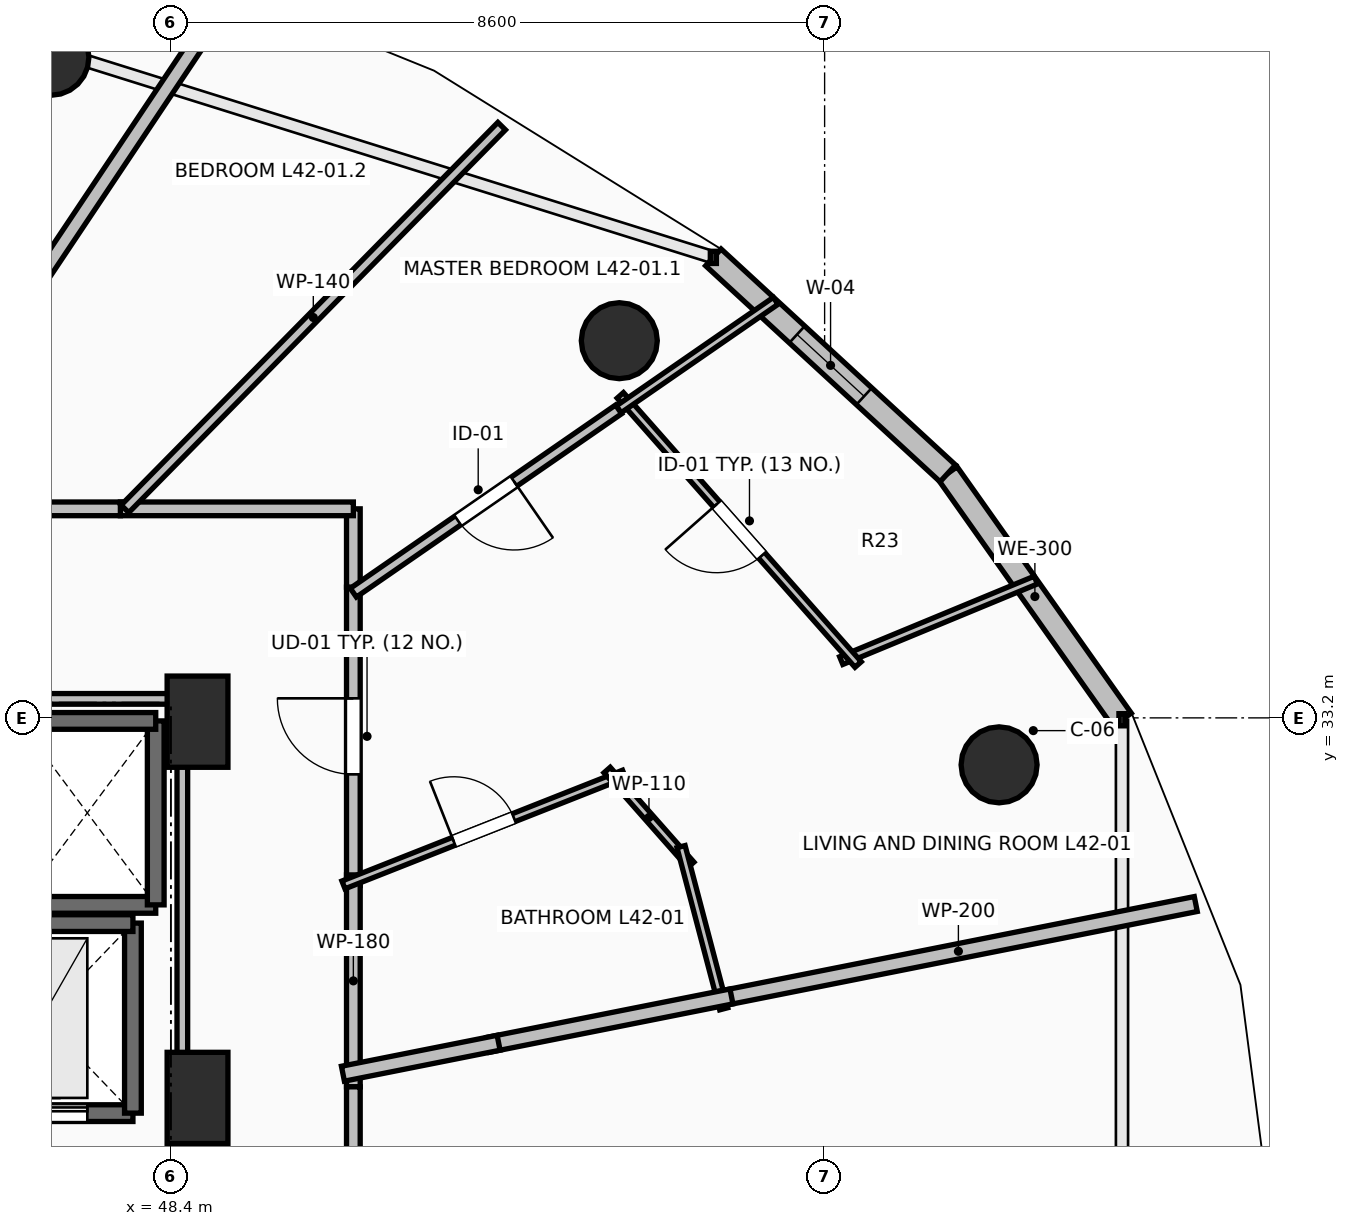
"""IFC4 building model, lengths in metres.
Left out: names, types, materials, properties, quantities, classifications, styles, units other than length and angle.
Written with IfcOpenShell. Run it as: python <this file> out.ifc"""

import sys

from ifc_helpers import new_model, si_unit, direction, frame, frame_2d, origin, origin_2d, place, context, subcontext, project, spatial, rectangle, circle, extrude, element, fill, save


model = new_model("IFC4")
c1 = context("Model", 3, precision=1e-05, world=origin(), true_north=direction((0.0, 1.0)))
c2 = subcontext(c1, "Body", "Model", "MODEL_VIEW")
j1 = project(units=[si_unit("LENGTHUNIT", "METRE"), si_unit("PLANEANGLEUNIT", "RADIAN")], contexts=[c1])
p1 = place(None, origin())
s1 = spatial("IfcSite", under=j1, at=p1, CompositionType="ELEMENT")
p2 = place(p1, origin())
s2 = spatial("IfcBuilding", under=s1, at=p2, CompositionType="ELEMENT")
p3 = place(p2, frame((0.0, 0.0, 157.1)))
s3 = spatial("IfcBuildingStorey", under=s2, at=p3, CompositionType="ELEMENT", Elevation=157.1)
for number, where, z_axis, x_axis in (
    (1, (59.295, 32.582, 0.0), (0.0, 0.0, 1.0), (0.924, 0.383, 0.0)),
    (2, (54.299, 38.162, 0.0), (0.0, 0.0, 1.0), (0.707, 0.707, 0.0)),
    (3, (46.821, 41.891, 0.0), (0.0, 0.0, 1.0), (0.383, 0.924, 0.0)),
):
    element("IfcColumn", number, at=place(p3, frame(where, z_axis=z_axis, x_axis=x_axis)), inside=s3, PredefinedType="COLUMN", context=c2, shape_type="SweptSolid", body=[
        extrude(circle(Radius=0.5, at=origin_2d()), origin(), (0.0, 0.0, 1.0), 3.5),
    ])
for number, where, z_axis, x_axis in (
    (4, (48.75, 33.15, 0.0), (0.0, 0.0, 1.0), (1.0, 0.0, 0.0)),
    (5, (48.75, 28.2, 0.0), (0.0, 0.0, 1.0), (1.0, 0.0, 0.0)),
):
    element("IfcColumn", number, at=place(p3, frame(where, z_axis=z_axis, x_axis=x_axis)), inside=s3, PredefinedType="PILASTER", context=c2, shape_type="SweptSolid", body=[
        extrude(rectangle(XDim=0.8, YDim=1.2, at=origin_2d()), origin(), (0.0, 0.0, 1.0), 3.5),
    ])
p4 = place(p3, frame((60.912, 33.175, 0.0), z_axis=(0.0, 0.0, 1.0), x_axis=(-0.577269753207, 0.816553508371, 0.0)))
e6 = element("IfcWall", 6, at=p4, inside=s3, PredefinedType="STANDARD", context=c2, shape_type="SweptSolid", body=[
    extrude(rectangle(XDim=3.97, YDim=0.3, at=frame_2d((1.985, 0.0))), origin(), (0.0, 0.0, 1.0), 3.24),
])
p5 = place(p3, frame((58.62, 36.417, 0.0), z_axis=(0.0, 0.0, 1.0), x_axis=(-0.735477154165, 0.677549522693, 0.0)))
e7 = element("IfcWall", 7, at=p5, inside=s3, PredefinedType="STANDARD", context=c2, shape_type="SweptSolid", body=[
    extrude(rectangle(XDim=4.194, YDim=0.3, at=frame_2d((2.097, 0.0))), origin(), (0.0, 0.0, 1.0), 3.24),
])
p6 = place(p5, frame((1.497, 0.0, 0.85)))
e8 = element("IfcOpeningElement", 8, at=p6, cuts=e7, PredefinedType="OPENING", context=c2, shape_type="SweptSolid", body=[
    extrude(rectangle(XDim=1.2, YDim=2.1, at=frame_2d((0.6, 1.05))), frame((0.0, 0.165, 0.0), z_axis=(0.0, -1.0, 0.0), x_axis=(1.0, 0.0, 0.0)), (0.0, 0.0, 1.0), 0.33),
])
p7 = place(p3, frame((46.4, 30.74, 0.0), z_axis=(0.0, 0.0, 1.0), x_axis=(1.0, 0.0, 0.0)))
e9 = element("IfcWall", 9, at=p7, inside=s3, PredefinedType="SOLIDWALL", context=c2, shape_type="SweptSolid", body=[
    extrude(rectangle(XDim=1.8, YDim=0.22, at=frame_2d((0.9, 0.0))), origin(), (0.0, 0.0, 1.0), 3.24),
])
p8 = place(p3, frame((48.2, 30.74, 0.0), z_axis=(0.0, 0.0, 1.0), x_axis=(0.0, 1.0, 0.0)))
e10 = element("IfcWall", 10, at=p8, inside=s3, PredefinedType="SOLIDWALL", context=c2, shape_type="SweptSolid", body=[
    extrude(rectangle(XDim=2.42, YDim=0.22, at=frame_2d((1.21, 0.0))), origin(), (0.0, 0.0, 1.0), 3.24),
])
p9 = place(p3, frame((48.2, 33.16, 0.0), z_axis=(0.0, 0.0, 1.0), x_axis=(-1.0, 0.0, 0.0)))
e11 = element("IfcWall", 11, at=p9, inside=s3, PredefinedType="SOLIDWALL", context=c2, shape_type="SweptSolid", body=[
    extrude(rectangle(XDim=1.8, YDim=0.22, at=frame_2d((0.9, 0.0))), origin(), (0.0, 0.0, 1.0), 3.24),
])
p10 = place(p3, frame((45.5, 28.0, 0.0), z_axis=(0.0, 0.0, 1.0), x_axis=(1.0, 0.0, 0.0)))
e12 = element("IfcWall", 12, at=p10, inside=s3, PredefinedType="SHEAR", context=c2, shape_type="SweptSolid", body=[
    extrude(rectangle(XDim=2.4, YDim=0.22, at=frame_2d((1.2, 0.0))), origin(), (0.0, 0.0, 1.0), 3.24),
])
p11 = place(p10, frame((0.6, 0.0, 0.0)))
e13 = element("IfcOpeningElement", 13, at=p11, cuts=e12, PredefinedType="OPENING", context=c2, shape_type="SweptSolid", body=[
    extrude(rectangle(XDim=1.2, YDim=2.2, at=frame_2d((0.6, 1.1))), frame((0.0, 0.125, 0.0), z_axis=(0.0, -1.0, 0.0), x_axis=(1.0, 0.0, 0.0)), (0.0, 0.0, 1.0), 0.25),
])
p12 = place(p3, frame((47.9, 28.0, 0.0), z_axis=(0.0, 0.0, 1.0), x_axis=(0.0, 1.0, 0.0)))
e14 = element("IfcWall", 14, at=p12, inside=s3, PredefinedType="SHEAR", context=c2, shape_type="SweptSolid", body=[
    extrude(rectangle(XDim=2.5, YDim=0.22, at=frame_2d((1.25, 0.0))), origin(), (0.0, 0.0, 1.0), 3.24),
])
p13 = place(p3, frame((47.9, 30.5, 0.0), z_axis=(0.0, 0.0, 1.0), x_axis=(-1.0, 0.0, 0.0)))
e15 = element("IfcWall", 15, at=p13, inside=s3, PredefinedType="SHEAR", context=c2, shape_type="SweptSolid", body=[
    extrude(rectangle(XDim=2.4, YDim=0.22, at=frame_2d((1.2, 0.0))), origin(), (0.0, 0.0, 1.0), 3.24),
])
p14 = place(p3, frame((48.45, 23.95, 0.0), z_axis=(0.0, 0.0, 1.0), x_axis=(0.0, 1.0, 0.0)))
e16 = element("IfcWall", 16, at=p14, inside=s3, PredefinedType="PARTITIONING", context=c2, shape_type="SweptSolid", body=[
    extrude(rectangle(XDim=4.05, YDim=0.18, at=frame_2d((2.025, 0.0))), origin(), (0.0, 0.0, 1.0), 3.24),
])
p15 = place(p14, frame((1.425, 0.0, 0.0)))
e17 = element("IfcOpeningElement", 17, at=p15, cuts=e16, PredefinedType="OPENING", context=c2, shape_type="SweptSolid", body=[
    extrude(rectangle(XDim=1.2, YDim=2.15, at=frame_2d((0.6, 1.075))), frame((0.0, 0.105, 0.0), z_axis=(0.0, -1.0, 0.0), x_axis=(1.0, 0.0, 0.0)), (0.0, 0.0, 1.0), 0.21),
])
p16 = place(p3, frame((50.8, 30.994, 0.0), z_axis=(0.0, 0.0, 1.0), x_axis=(0.0, 1.0, 0.0)))
e18 = element("IfcWall", 18, at=p16, inside=s3, PredefinedType="PARTITIONING", context=c2, shape_type="SweptSolid", body=[
    extrude(rectangle(XDim=3.926, YDim=0.18, at=frame_2d((1.963, 0.0))), origin(), (0.0, 0.0, 1.0), 2.432),
])
p17 = place(p16, frame((1.463, 0.0, 0.0)))
e19 = element("IfcOpeningElement", 19, at=p17, cuts=e18, PredefinedType="OPENING", context=c2, shape_type="SweptSolid", body=[
    extrude(rectangle(XDim=1.0, YDim=2.15, at=frame_2d((0.5, 1.075))), frame((0.0, 0.105, 0.0), z_axis=(0.0, -1.0, 0.0), x_axis=(1.0, 0.0, 0.0)), (0.0, 0.0, 1.0), 0.21),
])
p18 = place(p3, frame((50.8, 28.346, 0.0), z_axis=(0.0, 0.0, 1.0), x_axis=(0.0, 1.0, 0.0)))
e20 = element("IfcWall", 20, at=p18, inside=s3, PredefinedType="PARTITIONING", context=c2, shape_type="SweptSolid", body=[
    extrude(rectangle(XDim=2.788, YDim=0.18, at=frame_2d((1.394, 0.0))), origin(), (0.0, 0.0, 1.0), 3.24),
])
p19 = place(p3, frame((50.8, 34.92, 0.0), z_axis=(0.0, 0.0, 1.0), x_axis=(0.0, 1.0, 0.0)))
e21 = element("IfcWall", 21, at=p19, inside=s3, PredefinedType="PARTITIONING", context=c2, shape_type="SweptSolid", body=[
    extrude(rectangle(XDim=1.03, YDim=0.18, at=frame_2d((0.515, 0.0))), origin(), (0.0, 0.0, 1.0), 2.432),
])
p20 = place(p3, frame((50.8, 35.95, 0.0), z_axis=(0.0, 0.0, 1.0), x_axis=(-1.0, 0.0, 0.0)))
e22 = element("IfcWall", 22, at=p20, inside=s3, PredefinedType="PARTITIONING", context=c2, shape_type="SweptSolid", body=[
    extrude(rectangle(XDim=3.065, YDim=0.18, at=frame_2d((1.532, 0.0))), origin(), (0.0, 0.0, 1.0), 2.432),
])
p21 = place(p3, frame((47.735, 35.95, 0.0), z_axis=(0.0, 0.0, 1.0), x_axis=(-1.0, 0.0, 0.0)))
e23 = element("IfcWall", 23, at=p21, inside=s3, PredefinedType="PARTITIONING", context=c2, shape_type="SweptSolid", body=[
    extrude(rectangle(XDim=3.147, YDim=0.18, at=frame_2d((1.574, 0.0))), origin(), (0.0, 0.0, 1.0), 2.886),
])
p22 = place(p21, frame((1.148, 0.0, 0.0)))
e24 = element("IfcOpeningElement", 24, at=p22, cuts=e23, PredefinedType="OPENING", context=c2, shape_type="SweptSolid", body=[
    extrude(rectangle(XDim=0.85, YDim=2.1, at=frame_2d((0.425, 1.05))), frame((0.0, 0.105, 0.0), z_axis=(0.0, -1.0, 0.0), x_axis=(1.0, 0.0, 0.0)), (0.0, 0.0, 1.0), 0.21),
])
p23 = place(p3, frame((50.8, 27.25, 0.0), z_axis=(0.0, 0.0, 1.0), x_axis=(0.0, 1.0, 0.0)))
e25 = element("IfcWall", 25, at=p23, inside=s3, PredefinedType="PARTITIONING", context=c2, shape_type="SweptSolid", body=[
    extrude(rectangle(XDim=1.096, YDim=0.18, at=frame_2d((0.548, 0.0))), origin(), (0.0, 0.0, 1.0), 2.432),
])
p24 = place(p3, frame((50.67, 31.003, 0.0), z_axis=(0.0, 0.0, 1.0), x_axis=(0.930092731386, 0.367324803169, 0.0)))
e26 = element("IfcWall", 26, at=p24, inside=s3, PredefinedType="PARTITIONING", context=c2, shape_type="SweptSolid", body=[
    extrude(rectangle(XDim=3.969, YDim=0.11, at=frame_2d((1.984, 0.0))), origin(), (0.0, 0.0, 1.0), 2.886),
])
p25 = place(p24, frame((1.559, 0.0, 0.0)))
e27 = element("IfcOpeningElement", 27, at=p25, cuts=e26, PredefinedType="OPENING", context=c2, shape_type="SweptSolid", body=[
    extrude(rectangle(XDim=0.85, YDim=2.1, at=frame_2d((0.425, 1.05))), frame((0.0, 0.07, 0.0), z_axis=(0.0, -1.0, 0.0), x_axis=(1.0, 0.0, 0.0)), (0.0, 0.0, 1.0), 0.14),
])
p26 = place(p3, frame((54.138, 32.514, 0.0), z_axis=(0.0, 0.0, 1.0), x_axis=(0.661645897528, -0.749816448396, 0.0)))
e28 = element("IfcWall", 28, at=p26, inside=s3, PredefinedType="PARTITIONING", context=c2, shape_type="SweptSolid", body=[
    extrude(rectangle(XDim=1.664, YDim=0.11, at=frame_2d((0.832, 0.0))), origin(), (0.0, 0.0, 1.0), 3.24),
])
p27 = place(p3, frame((55.111, 31.506, 0.0), z_axis=(0.0, 0.0, 1.0), x_axis=(0.254389812051, -0.967101764823, 0.0)))
e29 = element("IfcWall", 29, at=p27, inside=s3, PredefinedType="PARTITIONING", context=c2, shape_type="SweptSolid", body=[
    extrude(rectangle(XDim=2.206, YDim=0.11, at=frame_2d((1.103, 0.0))), origin(), (0.0, 0.0, 1.0), 3.24),
])
p28 = place(p3, frame((59.778, 35.012, 0.0), z_axis=(0.0, 0.0, 1.0), x_axis=(-0.924067287951, -0.382229835751, 0.0)))
e30 = element("IfcWall", 30, at=p28, inside=s3, PredefinedType="PARTITIONING", context=c2, shape_type="SweptSolid", body=[
    extrude(rectangle(XDim=2.77, YDim=0.11, at=frame_2d((1.385, 0.0))), origin(), (0.0, 0.0, 1.0), 2.728),
])
p29 = place(p3, frame((57.441, 33.902, 0.0), z_axis=(0.0, 0.0, 1.0), x_axis=(-0.662122223318, 0.749395864272, 0.0)))
e31 = element("IfcWall", 31, at=p29, inside=s3, PredefinedType="PARTITIONING", context=c2, shape_type="SweptSolid", body=[
    extrude(rectangle(XDim=4.725, YDim=0.11, at=frame_2d((2.362, 0.0))), origin(), (0.0, 0.0, 1.0), 3.24),
])
p30 = place(p29, frame((1.912, 0.0, 0.0)))
e32 = element("IfcOpeningElement", 32, at=p30, cuts=e31, PredefinedType="OPENING", context=c2, shape_type="SweptSolid", body=[
    extrude(rectangle(XDim=0.9, YDim=2.1, at=frame_2d((0.45, 1.05))), frame((0.0, 0.07, 0.0), z_axis=(0.0, -1.0, 0.0), x_axis=(1.0, 0.0, 0.0)), (0.0, 0.0, 1.0), 0.14),
])
p31 = place(p3, frame((54.29, 37.258, 0.0), z_axis=(0.0, 0.0, 1.0), x_axis=(0.822632807799, 0.568573006335, 0.0)))
e33 = element("IfcWall", 33, at=p31, inside=s3, PredefinedType="PARTITIONING", context=c2, shape_type="SweptSolid", body=[
    extrude(rectangle(XDim=2.512, YDim=0.11, at=frame_2d((1.256, 0.0))), origin(), (0.0, 0.0, 1.0), 2.728),
])
p32 = place(p3, frame((54.29, 37.259, 0.0), z_axis=(0.0, 0.0, 1.0), x_axis=(-0.822672586971, -0.568515448027, 0.0)))
e34 = element("IfcWall", 34, at=p32, inside=s3, PredefinedType="PARTITIONING", context=c2, shape_type="SweptSolid", body=[
    extrude(rectangle(XDim=4.242, YDim=0.14, at=frame_2d((2.121, 0.0))), origin(), (0.0, 0.0, 1.0), 2.432),
])
p33 = place(p32, frame((1.671, 0.0, 0.0)))
e35 = element("IfcOpeningElement", 35, at=p33, cuts=e34, PredefinedType="OPENING", context=c2, shape_type="SweptSolid", body=[
    extrude(rectangle(XDim=0.9, YDim=2.1, at=frame_2d((0.45, 1.05))), frame((0.0, 0.085, 0.0), z_axis=(0.0, -1.0, 0.0), x_axis=(1.0, 0.0, 0.0)), (0.0, 0.0, 1.0), 0.17),
])
p34 = place(p3, frame((55.637, 29.508, 0.0), z_axis=(0.0, 0.0, 1.0), x_axis=(0.98077041661, 0.19516503248, 0.0)))
e36 = element("IfcWall", 36, at=p34, inside=s3, PredefinedType="PARTITIONING", context=c2, shape_type="SweptSolid", body=[
    extrude(rectangle(XDim=6.369, YDim=0.2, at=frame_2d((3.184, 0.0))), origin(), (0.0, 0.0, 1.0), 2.728),
])
p35 = place(p3, frame((52.574, 28.899, 0.0), z_axis=(0.0, 0.0, 1.0), x_axis=(0.980781574696, 0.195108950939, 0.0)))
e37 = element("IfcWall", 37, at=p35, inside=s3, PredefinedType="PARTITIONING", context=c2, shape_type="SweptSolid", body=[
    extrude(rectangle(XDim=3.263, YDim=0.2, at=frame_2d((1.632, 0.0))), origin(), (0.0, 0.0, 1.0), 2.886),
])
p36 = place(p3, frame((50.663, 28.519, 0.0), z_axis=(0.0, 0.0, 1.0), x_axis=(0.980804842296, 0.194991951961, 0.0)))
e38 = element("IfcWall", 38, at=p36, inside=s3, PredefinedType="PARTITIONING", context=c2, shape_type="SweptSolid", body=[
    extrude(rectangle(XDim=2.088, YDim=0.2, at=frame_2d((1.044, 0.0))), origin(), (0.0, 0.0, 1.0), 2.886),
])
p37 = place(p3, frame((52.751, 40.985, 0.0), z_axis=(0.0, 0.0, 1.0), x_axis=(-0.701486551238, -0.712682691268, 0.0)))
e39 = element("IfcWall", 39, at=p37, inside=s3, PredefinedType="PARTITIONING", context=c2, shape_type="SweptSolid", body=[
    extrude(rectangle(XDim=7.065, YDim=0.14, at=frame_2d((3.533, 0.0))), origin(), (0.0, 0.0, 1.0), 2.432),
])
p38 = place(p3, frame((49.131, 42.659, 0.0), z_axis=(0.0, 0.0, 1.0), x_axis=(-0.555600584712, -0.831449331149, 0.0)))
e40 = element("IfcWall", 40, at=p38, inside=s3, PredefinedType="PARTITIONING", context=c2, shape_type="SweptSolid", body=[
    extrude(rectangle(XDim=8.069, YDim=0.2, at=frame_2d((4.035, 0.0))), origin(), (0.0, 0.0, 1.0), 2.432),
])
p39 = place(p3, frame((48.55, 28.196, 0.0), z_axis=(0.0, 0.0, 1.0), x_axis=(0.0, 1.0, 0.0)))
e41 = element("IfcWall", 41, at=p39, inside=s3, PredefinedType="PARTITIONING", context=c2, shape_type="SweptSolid", body=[
    extrude(rectangle(XDim=5.254, YDim=0.14, at=frame_2d((2.627, 0.0))), origin(), (0.0, 0.0, 1.0), 2.432),
])
p40 = place(p3, frame((48.55, 33.45, 0.0), z_axis=(0.0, 0.0, 1.0), x_axis=(-1.0, 0.0, 0.0)))
e42 = element("IfcWall", 42, at=p40, inside=s3, PredefinedType="PARTITIONING", context=c2, shape_type="SweptSolid", body=[
    extrude(rectangle(XDim=4.21, YDim=0.14, at=frame_2d((2.105, 0.0))), origin(), (0.0, 0.0, 1.0), 2.432),
])
p41 = place(p6, origin())
e43 = element("IfcWindow", 43, at=p41, inside=s3, PartitioningType="SINGLE_PANEL", PredefinedType="WINDOW", context=c2, shape_type="SweptSolid", body=[
    extrude(rectangle(XDim=1.2, YDim=2.1, at=frame_2d((0.6, 1.05))), frame((0.0, 0.03, 0.0), z_axis=(0.0, -1.0, 0.0), x_axis=(1.0, 0.0, 0.0)), (0.0, 0.0, 1.0), 0.06),
])
fill(e8, e43)
p42 = place(p11, origin())
e44 = element("IfcDoor", 44, at=p42, inside=s3, OperationType="SLIDING_TO_LEFT", PredefinedType="DOOR", context=c2, shape_type="SweptSolid", body=[
    extrude(rectangle(XDim=1.2, YDim=2.2, at=frame_2d((0.6, 1.1))), frame((0.0, 0.025, 0.0), z_axis=(0.0, -1.0, 0.0), x_axis=(1.0, 0.0, 0.0)), (0.0, 0.0, 1.0), 0.05),
])
fill(e13, e44)
p43 = place(p17, origin())
e45 = element("IfcDoor", 45, at=p43, inside=s3, OperationType="SINGLE_SWING_RIGHT", PredefinedType="DOOR", context=c2, shape_type="SweptSolid", body=[
    extrude(rectangle(XDim=1.0, YDim=2.15, at=frame_2d((0.5, 1.075))), frame((0.0, 0.025, 0.0), z_axis=(0.0, -1.0, 0.0), x_axis=(1.0, 0.0, 0.0)), (0.0, 0.0, 1.0), 0.05),
])
fill(e19, e45)
p44 = place(p25, origin())
e46 = element("IfcDoor", 46, at=p44, inside=s3, OperationType="SINGLE_SWING_LEFT", PredefinedType="DOOR", context=c2, shape_type="SweptSolid", body=[
    extrude(rectangle(XDim=0.85, YDim=2.1, at=frame_2d((0.425, 1.05))), frame((0.0, 0.025, 0.0), z_axis=(0.0, -1.0, 0.0), x_axis=(1.0, 0.0, 0.0)), (0.0, 0.0, 1.0), 0.05),
])
fill(e27, e46)
p45 = place(p30, origin())
e47 = element("IfcDoor", 47, at=p45, inside=s3, OperationType="SINGLE_SWING_RIGHT", PredefinedType="DOOR", context=c2, shape_type="SweptSolid", body=[
    extrude(rectangle(XDim=0.9, YDim=2.1, at=frame_2d((0.45, 1.05))), frame((0.0, 0.025, 0.0), z_axis=(0.0, -1.0, 0.0), x_axis=(1.0, 0.0, 0.0)), (0.0, 0.0, 1.0), 0.05),
])
fill(e32, e47)
p46 = place(p33, origin())
e48 = element("IfcDoor", 48, at=p46, inside=s3, OperationType="SINGLE_SWING_LEFT", PredefinedType="DOOR", context=c2, shape_type="SweptSolid", body=[
    extrude(rectangle(XDim=0.9, YDim=2.1, at=frame_2d((0.45, 1.05))), frame((0.0, 0.025, 0.0), z_axis=(0.0, -1.0, 0.0), x_axis=(1.0, 0.0, 0.0)), (0.0, 0.0, 1.0), 0.05),
])
fill(e35, e48)
save(model, sys.argv[1])
